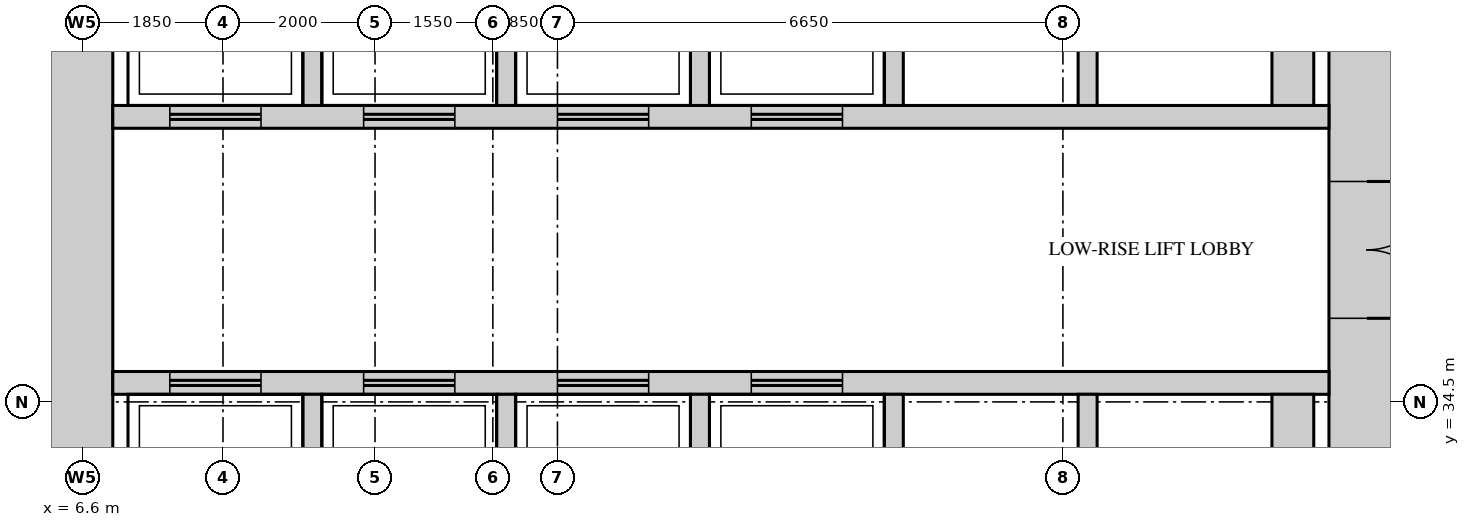
"""IFC4 building model, lengths in metres.
Left out: names, types, materials, properties, quantities, classifications, styles, units other than length and angle.
Written with IfcOpenShell. Run it as: python <this file> out.ifc"""

import sys

from ifc_helpers import new_model, si_unit, direction, frame, frame_2d, origin, place, context, subcontext, project, spatial, rectangle, extrude, source, transform, mapped, element, fill, save


model = new_model("IFC4")
c1 = context("Model", 3, precision=1e-05, world=origin(), true_north=direction((0.0, 1.0)))
c2 = subcontext(c1, "Body", "Model", "MODEL_VIEW")
j1 = project(units=[si_unit("LENGTHUNIT", "METRE"), si_unit("PLANEANGLEUNIT", "RADIAN")], contexts=[c1])
p1 = place(None, origin())
s1 = spatial("IfcSite", under=j1, at=p1, CompositionType="ELEMENT")
p2 = place(p1, origin())
s2 = spatial("IfcBuilding", under=s1, at=p2, CompositionType="ELEMENT")
p3 = place(p2, frame((0.0, 0.0, 154.3)))
s3 = spatial("IfcBuildingStorey", under=s2, at=p3, CompositionType="ELEMENT", Elevation=154.3)
m1 = source(origin(), c2, "Body", "SweptSolid", [
    extrude(rectangle(XDim=28.0, YDim=1.0, at=frame_2d((14.0, 0.0))), origin(), (0.0, 0.0, 1.0), 4.1),
])
p4 = place(p3, frame((23.5, 13.0, 0.0), z_axis=(0.0, 0.0, 1.0), x_axis=(0.0, 1.0, 0.0)))
e1 = element("IfcWall", 1, at=p4, inside=s3, PredefinedType="SHEAR", context=c2, shape_type="MappedRepresentation", body=[
    mapped(m1, transform((0.0, 0.0, 0.0))),
])
m2 = source(origin(), c2, "Body", "SweptSolid", [
    extrude(rectangle(XDim=1.8, YDim=2.1, at=frame_2d((0.9, 1.05))), frame((0.0, 0.51, 0.0), z_axis=(0.0, -1.0, 0.0), x_axis=(1.0, 0.0, 0.0)), (0.0, 0.0, 1.0), 1.02),
])
p5 = place(p4, frame((22.6, 0.0, 0.0)))
e2 = element("IfcOpeningElement", 2, at=p5, cuts=e1, PredefinedType="OPENING", context=c2, shape_type="MappedRepresentation", body=[
    mapped(m2, transform((0.0, 0.0, 0.0))),
])
m3 = source(origin(), c2, "Body", "SweptSolid", [
    extrude(rectangle(XDim=1.2, YDim=2.1, at=frame_2d((0.6, 1.05))), frame((0.0, 0.51, 0.0), z_axis=(0.0, -1.0, 0.0), x_axis=(1.0, 0.0, 0.0)), (0.0, 0.0, 1.0), 1.02),
])
p6 = place(p4, frame((14.6, 0.0, 0.0)))
e3 = element("IfcOpeningElement", 3, at=p6, cuts=e1, PredefinedType="OPENING", context=c2, shape_type="MappedRepresentation", body=[
    mapped(m3, transform((0.0, 0.0, 0.0))),
])
m4 = source(origin(), c2, "Body", "SweptSolid", [
    extrude(rectangle(XDim=0.9, YDim=2.1, at=frame_2d((0.45, 1.05))), frame((0.0, 0.51, 0.0), z_axis=(0.0, -1.0, 0.0), x_axis=(1.0, 0.0, 0.0)), (0.0, 0.0, 1.0), 1.02),
])
p7 = place(p4, frame((1.35, 0.0, 0.0)))
e4 = element("IfcOpeningElement", 4, at=p7, cuts=e1, PredefinedType="OPENING", context=c2, shape_type="MappedRepresentation", body=[
    mapped(m4, transform((0.0, 0.0, 0.0))),
])
p8 = place(p4, frame((6.2, 0.0, 0.0)))
e5 = element("IfcOpeningElement", 5, at=p8, cuts=e1, PredefinedType="OPENING", context=c2, shape_type="MappedRepresentation", body=[
    mapped(m4, transform((0.0, 0.0, 0.0))),
])
p9 = place(p3, frame((6.5, 13.0, 0.0), z_axis=(0.0, 0.0, 1.0), x_axis=(0.0, 1.0, 0.0)))
e6 = element("IfcWall", 6, at=p9, inside=s3, PredefinedType="SHEAR", context=c2, shape_type="MappedRepresentation", body=[
    mapped(m1, transform((0.0, 0.0, 0.0))),
])
m5 = source(origin(), c2, "Body", "SweptSolid", [
    extrude(rectangle(XDim=16.0, YDim=0.3, at=frame_2d((8.0, 0.0))), origin(), (0.0, 0.0, 1.0), 4.1),
])
p10 = place(p3, frame((7.0, 38.25, 0.0), z_axis=(0.0, 0.0, 1.0), x_axis=(1.0, 0.0, 0.0)))
e7 = element("IfcWall", 7, at=p10, inside=s3, PredefinedType="STANDARD", context=c2, shape_type="MappedRepresentation", body=[
    mapped(m5, transform((0.0, 0.0, 0.0))),
])
m6 = source(origin(), c2, "Body", "SweptSolid", [
    extrude(rectangle(XDim=1.2, YDim=2.1, at=frame_2d((0.6, 1.05))), frame((0.0, 0.16, 0.0), z_axis=(0.0, -1.0, 0.0), x_axis=(1.0, 0.0, 0.0)), (0.0, 0.0, 1.0), 0.32),
])
p11 = place(p10, frame((0.75, 0.0, 0.0)))
e8 = element("IfcOpeningElement", 8, at=p11, cuts=e7, PredefinedType="OPENING", context=c2, shape_type="MappedRepresentation", body=[
    mapped(m6, transform((0.0, 0.0, 0.0))),
])
p12 = place(p10, frame((3.3, 0.0, 0.0)))
e9 = element("IfcOpeningElement", 9, at=p12, cuts=e7, PredefinedType="OPENING", context=c2, shape_type="MappedRepresentation", body=[
    mapped(m6, transform((0.0, 0.0, 0.0))),
])
p13 = place(p10, frame((5.85, 0.0, 0.0)))
e10 = element("IfcOpeningElement", 10, at=p13, cuts=e7, PredefinedType="OPENING", context=c2, shape_type="MappedRepresentation", body=[
    mapped(m6, transform((0.0, 0.0, 0.0))),
])
p14 = place(p10, frame((8.4, 0.0, 0.0)))
e11 = element("IfcOpeningElement", 11, at=p14, cuts=e7, PredefinedType="OPENING", context=c2, shape_type="MappedRepresentation", body=[
    mapped(m6, transform((0.0, 0.0, 0.0))),
])
p15 = place(p3, frame((7.0, 34.75, 0.0), z_axis=(0.0, 0.0, 1.0), x_axis=(1.0, 0.0, 0.0)))
e12 = element("IfcWall", 12, at=p15, inside=s3, PredefinedType="STANDARD", context=c2, shape_type="MappedRepresentation", body=[
    mapped(m5, transform((0.0, 0.0, 0.0))),
])
p16 = place(p15, frame((0.75, 0.0, 0.0)))
e13 = element("IfcOpeningElement", 13, at=p16, cuts=e12, PredefinedType="OPENING", context=c2, shape_type="MappedRepresentation", body=[
    mapped(m6, transform((0.0, 0.0, 0.0))),
])
p17 = place(p15, frame((3.3, 0.0, 0.0)))
e14 = element("IfcOpeningElement", 14, at=p17, cuts=e12, PredefinedType="OPENING", context=c2, shape_type="MappedRepresentation", body=[
    mapped(m6, transform((0.0, 0.0, 0.0))),
])
p18 = place(p15, frame((5.85, 0.0, 0.0)))
e15 = element("IfcOpeningElement", 15, at=p18, cuts=e12, PredefinedType="OPENING", context=c2, shape_type="MappedRepresentation", body=[
    mapped(m6, transform((0.0, 0.0, 0.0))),
])
p19 = place(p15, frame((8.4, 0.0, 0.0)))
e16 = element("IfcOpeningElement", 16, at=p19, cuts=e12, PredefinedType="OPENING", context=c2, shape_type="MappedRepresentation", body=[
    mapped(m6, transform((0.0, 0.0, 0.0))),
])
m7 = source(origin(), c2, "Body", "SweptSolid", [
    extrude(rectangle(XDim=2.6, YDim=0.25, at=frame_2d((1.3, 0.0))), origin(), (0.0, 0.0, 1.0), 4.1),
])
for number, where, z_axis, x_axis in (
    (17, (9.625, 38.4, 0.0), (0.0, 0.0, 1.0), (0.0, 1.0, 0.0)),
    (18, (12.175, 38.4, 0.0), (0.0, 0.0, 1.0), (0.0, 1.0, 0.0)),
    (19, (14.725, 38.4, 0.0), (0.0, 0.0, 1.0), (0.0, 1.0, 0.0)),
    (20, (17.275, 38.4, 0.0), (0.0, 0.0, 1.0), (0.0, 1.0, 0.0)),
    (21, (19.825, 38.4, 0.0), (0.0, 0.0, 1.0), (0.0, 1.0, 0.0)),
):
    element("IfcWall", number, at=place(p3, frame(where, z_axis=z_axis, x_axis=x_axis)), inside=s3, PredefinedType="STANDARD", context=c2, shape_type="MappedRepresentation", body=[
        mapped(m7, transform((0.0, 0.0, 0.0))),
    ])
m8 = source(origin(), c2, "Body", "SweptSolid", [
    extrude(rectangle(XDim=2.6, YDim=0.55, at=frame_2d((1.3, 0.0))), origin(), (0.0, 0.0, 1.0), 4.1),
])
p20 = place(p3, frame((22.525, 38.4, 0.0), z_axis=(0.0, 0.0, 1.0), x_axis=(0.0, 1.0, 0.0)))
e22 = element("IfcWall", 22, at=p20, inside=s3, PredefinedType="STANDARD", context=c2, shape_type="MappedRepresentation", body=[
    mapped(m8, transform((0.0, 0.0, 0.0))),
])
m9 = source(origin(), c2, "Body", "SweptSolid", [
    extrude(rectangle(XDim=2.4, YDim=0.25, at=frame_2d((1.2, 0.0))), origin(), (0.0, 0.0, 1.0), 4.1),
])
for number, where, z_axis, x_axis in (
    (23, (9.625, 32.2, 0.0), (0.0, 0.0, 1.0), (0.0, 1.0, 0.0)),
    (24, (12.175, 32.2, 0.0), (0.0, 0.0, 1.0), (0.0, 1.0, 0.0)),
    (25, (14.725, 32.2, 0.0), (0.0, 0.0, 1.0), (0.0, 1.0, 0.0)),
    (26, (17.275, 32.2, 0.0), (0.0, 0.0, 1.0), (0.0, 1.0, 0.0)),
    (27, (19.825, 32.2, 0.0), (0.0, 0.0, 1.0), (0.0, 1.0, 0.0)),
):
    element("IfcWall", number, at=place(p3, frame(where, z_axis=z_axis, x_axis=x_axis)), inside=s3, PredefinedType="STANDARD", context=c2, shape_type="MappedRepresentation", body=[
        mapped(m9, transform((0.0, 0.0, 0.0))),
    ])
m10 = source(origin(), c2, "Body", "SweptSolid", [
    extrude(rectangle(XDim=2.4, YDim=0.55, at=frame_2d((1.2, 0.0))), origin(), (0.0, 0.0, 1.0), 4.1),
])
p21 = place(p3, frame((22.525, 32.2, 0.0), z_axis=(0.0, 0.0, 1.0), x_axis=(0.0, 1.0, 0.0)))
e28 = element("IfcWall", 28, at=p21, inside=s3, PredefinedType="STANDARD", context=c2, shape_type="MappedRepresentation", body=[
    mapped(m10, transform((0.0, 0.0, 0.0))),
])
m11 = source(origin(), c2, "Body", "SweptSolid", [
    extrude(rectangle(XDim=1.8, YDim=2.1, at=frame_2d((0.9, 1.05))), frame((0.0, 0.45, 0.0), z_axis=(0.0, -1.0, 0.0), x_axis=(1.0, 0.0, 0.0)), (0.0, 0.0, 1.0), 0.9),
])
p22 = place(p5, origin())
e29 = element("IfcDoor", 29, at=p22, inside=s3, OperationType="DOUBLE_DOOR_SINGLE_SWING", PredefinedType="DOOR", context=c2, shape_type="MappedRepresentation", body=[
    mapped(m11, transform((0.0, 0.0, 0.0))),
])
fill(e2, e29)
m12 = source(origin(), c2, "Body", "SweptSolid", [
    extrude(rectangle(XDim=1.2, YDim=2.1, at=frame_2d((0.6, 1.05))), frame((0.0, 0.025, 0.0), z_axis=(0.0, -1.0, 0.0), x_axis=(1.0, 0.0, 0.0)), (0.0, 0.0, 1.0), 0.05),
])
p23 = place(p16, origin())
e30 = element("IfcDoor", 30, at=p23, inside=s3, OperationType="DOUBLE_DOOR_SLIDING", PredefinedType="DOOR", context=c2, shape_type="MappedRepresentation", body=[
    mapped(m12, transform((0.0, 0.0, 0.0))),
])
fill(e13, e30)
p24 = place(p17, origin())
e31 = element("IfcDoor", 31, at=p24, inside=s3, OperationType="DOUBLE_DOOR_SLIDING", PredefinedType="DOOR", context=c2, shape_type="MappedRepresentation", body=[
    mapped(m12, transform((0.0, 0.0, 0.0))),
])
fill(e14, e31)
p25 = place(p18, origin())
e32 = element("IfcDoor", 32, at=p25, inside=s3, OperationType="DOUBLE_DOOR_SLIDING", PredefinedType="DOOR", context=c2, shape_type="MappedRepresentation", body=[
    mapped(m12, transform((0.0, 0.0, 0.0))),
])
fill(e15, e32)
p26 = place(p19, origin())
e33 = element("IfcDoor", 33, at=p26, inside=s3, OperationType="DOUBLE_DOOR_SLIDING", PredefinedType="DOOR", context=c2, shape_type="MappedRepresentation", body=[
    mapped(m12, transform((0.0, 0.0, 0.0))),
])
fill(e16, e33)
p27 = place(p11, origin())
e34 = element("IfcDoor", 34, at=p27, inside=s3, OperationType="DOUBLE_DOOR_SLIDING", PredefinedType="DOOR", context=c2, shape_type="MappedRepresentation", body=[
    mapped(m12, transform((0.0, 0.0, 0.0))),
])
fill(e8, e34)
p28 = place(p12, origin())
e35 = element("IfcDoor", 35, at=p28, inside=s3, OperationType="DOUBLE_DOOR_SLIDING", PredefinedType="DOOR", context=c2, shape_type="MappedRepresentation", body=[
    mapped(m12, transform((0.0, 0.0, 0.0))),
])
fill(e9, e35)
p29 = place(p13, origin())
e36 = element("IfcDoor", 36, at=p29, inside=s3, OperationType="DOUBLE_DOOR_SLIDING", PredefinedType="DOOR", context=c2, shape_type="MappedRepresentation", body=[
    mapped(m12, transform((0.0, 0.0, 0.0))),
])
fill(e10, e36)
p30 = place(p14, origin())
e37 = element("IfcDoor", 37, at=p30, inside=s3, OperationType="DOUBLE_DOOR_SLIDING", PredefinedType="DOOR", context=c2, shape_type="MappedRepresentation", body=[
    mapped(m12, transform((0.0, 0.0, 0.0))),
])
fill(e11, e37)
save(model, sys.argv[1])
